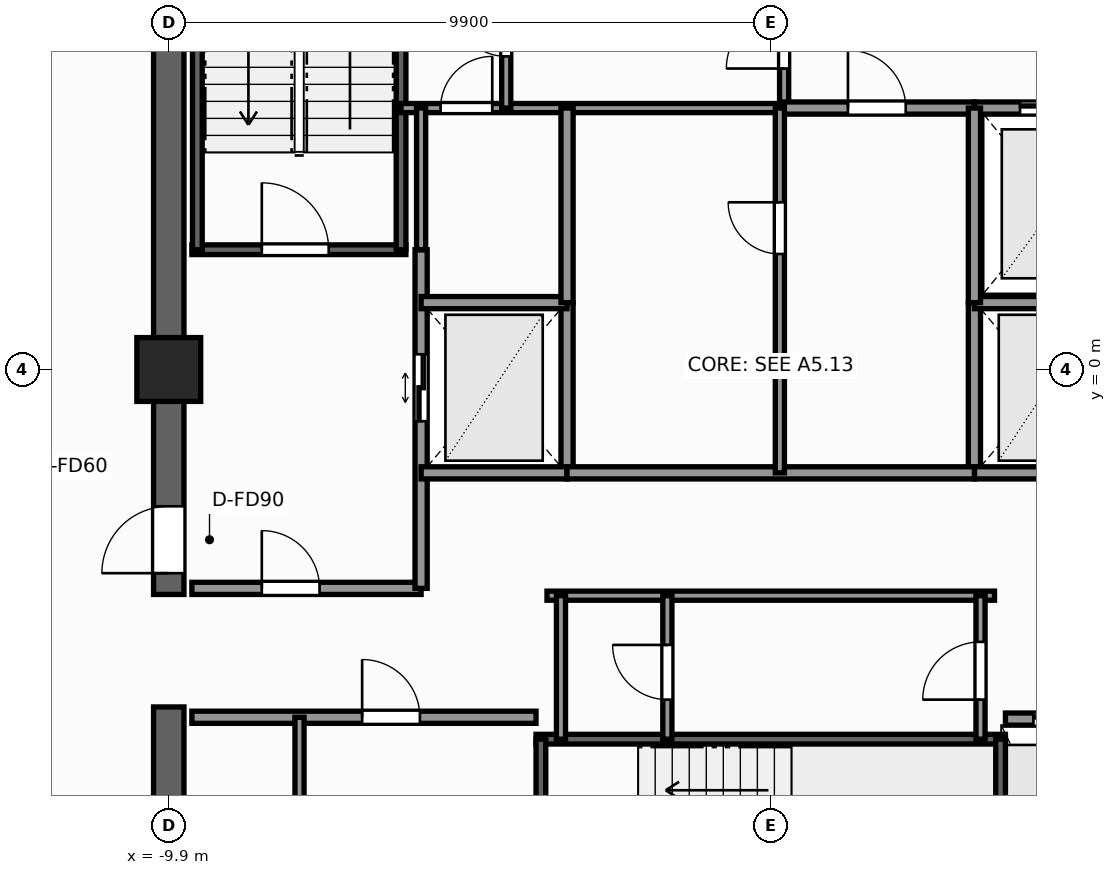
"""IFC4 building model, lengths in metres.
Left out: names, types, materials, properties, quantities, classifications, styles, units other than length and angle.
Written with IfcOpenShell. Run it as: python <this file> out.ifc"""

import sys

from ifc_helpers import new_model, si_unit, direction, frame, frame_2d, origin, origin_2d, place, context, subcontext, project, spatial, rectangle, extrude, element, fill, save


model = new_model("IFC4")
c1 = context("Model", 3, precision=1e-05, world=origin(), true_north=direction((0.0, 1.0)))
c2 = subcontext(c1, "Body", "Model", "MODEL_VIEW")
j1 = project(units=[si_unit("LENGTHUNIT", "METRE"), si_unit("PLANEANGLEUNIT", "RADIAN")], contexts=[c1])
p1 = place(None, origin())
s1 = spatial("IfcSite", under=j1, at=p1, CompositionType="ELEMENT")
p2 = place(p1, origin())
s2 = spatial("IfcBuilding", under=s1, at=p2, CompositionType="ELEMENT")
p3 = place(p2, frame((0.0, 0.0, 199.8)))
s3 = spatial("IfcBuildingStorey", under=s2, at=p3, CompositionType="ELEMENT", Elevation=199.8)
p4 = place(p3, frame((-9.9, -9.65, 0.0), z_axis=(0.0, 0.0, 1.0), x_axis=(0.0, 1.0, 0.0)))
e1 = element("IfcWall", 1, at=p4, inside=s3, PredefinedType="SHEAR", context=c2, shape_type="SweptSolid", body=[
    extrude(rectangle(XDim=4.1, YDim=0.5, at=frame_2d((2.05, 0.0))), origin(), (0.0, 0.0, 1.0), 3.3),
])
p5 = place(p3, frame((-9.9, -3.7, 0.0), z_axis=(0.0, 0.0, 1.0), x_axis=(0.0, 1.0, 0.0)))
e2 = element("IfcWall", 2, at=p5, inside=s3, PredefinedType="SHEAR", context=c2, shape_type="SweptSolid", body=[
    extrude(rectangle(XDim=13.35, YDim=0.5, at=frame_2d((6.675, 0.0))), origin(), (0.0, 0.0, 1.0), 3.3),
])
p6 = place(p5, frame((0.35, 0.0, 0.0)))
e3 = element("IfcOpeningElement", 3, at=p6, cuts=e2, PredefinedType="OPENING", context=c2, shape_type="SweptSolid", body=[
    extrude(rectangle(XDim=1.1, YDim=2.2, at=frame_2d((0.55, 1.1))), frame((0.0, 0.26, 0.0), z_axis=(0.0, -1.0, 0.0), x_axis=(1.0, 0.0, 0.0)), (0.0, 0.0, 1.0), 0.52),
])
p7 = place(p3, frame((-9.9, 0.0, 0.0), z_axis=(0.0, 0.0, 1.0), x_axis=(1.0, 0.0, 0.0)))
e4 = element("IfcColumn", 4, at=p7, inside=s3, PredefinedType="COLUMN", context=c2, shape_type="SweptSolid", body=[
    extrude(rectangle(XDim=1.05, YDim=1.05, at=origin_2d()), origin(), (0.0, 0.0, 1.0), 3.3),
])
p8 = place(p3, frame((-9.52, 1.97, 0.0), z_axis=(0.0, 0.0, 1.0), x_axis=(1.0, 0.0, 0.0)))
e5 = element("IfcWall", 5, at=p8, inside=s3, PredefinedType="SHEAR", context=c2, shape_type="SweptSolid", body=[
    extrude(rectangle(XDim=3.52, YDim=0.16, at=frame_2d((1.76, 0.0))), origin(), (0.0, 0.0, 1.0), 3.3),
])
p9 = place(p8, frame((1.15, 0.0, 0.0)))
e6 = element("IfcOpeningElement", 6, at=p9, cuts=e5, PredefinedType="OPENING", context=c2, shape_type="SweptSolid", body=[
    extrude(rectangle(XDim=1.1, YDim=2.2, at=frame_2d((0.55, 1.1))), frame((0.0, 0.09, 0.0), z_axis=(0.0, -1.0, 0.0), x_axis=(1.0, 0.0, 0.0)), (0.0, 0.0, 1.0), 0.18),
])
for number, where, z_axis, x_axis in (
    (7, (-9.43, 1.97, 0.0), (0.0, 0.0, 1.0), (0.0, 1.0, 0.0)),
    (8, (-6.08, 1.97, 0.0), (0.0, 0.0, 1.0), (0.0, 1.0, 0.0)),
):
    element("IfcWall", number, at=place(p3, frame(where, z_axis=z_axis, x_axis=x_axis)), inside=s3, PredefinedType="SHEAR", context=c2, shape_type="SweptSolid", body=[
        extrude(rectangle(XDim=7.56, YDim=0.16, at=frame_2d((3.78, 0.0))), origin(), (0.0, 0.0, 1.0), 3.3),
    ])
p10 = place(p3, frame((-3.86, -6.08, 0.0), z_axis=(0.0, 0.0, 1.0), x_axis=(1.0, 0.0, 0.0)))
e9 = element("IfcWall", 9, at=p10, inside=s3, PredefinedType="SHEAR", context=c2, shape_type="SweptSolid", body=[
    extrude(rectangle(XDim=7.72, YDim=0.16, at=frame_2d((3.86, 0.0))), origin(), (0.0, 0.0, 1.0), 3.3),
])
for number, where, z_axis, x_axis in (
    (10, (-3.78, -9.43, 0.0), (0.0, 0.0, 1.0), (0.0, 1.0, 0.0)),
    (11, (3.78, -9.43, 0.0), (0.0, 0.0, 1.0), (0.0, 1.0, 0.0)),
):
    element("IfcWall", number, at=place(p3, frame(where, z_axis=z_axis, x_axis=x_axis)), inside=s3, PredefinedType="SHEAR", context=c2, shape_type="SweptSolid", body=[
        extrude(rectangle(XDim=3.35, YDim=0.16, at=frame_2d((1.675, 0.0))), origin(), (0.0, 0.0, 1.0), 3.3),
    ])
p11 = place(p3, frame((-9.52, -3.6, 0.0), z_axis=(0.0, 0.0, 1.0), x_axis=(1.0, 0.0, 0.0)))
e12 = element("IfcWall", 12, at=p11, inside=s3, PredefinedType="SOLIDWALL", context=c2, shape_type="SweptSolid", body=[
    extrude(rectangle(XDim=3.77, YDim=0.2, at=frame_2d((1.885, 0.0))), origin(), (0.0, 0.0, 1.0), 3.08),
])
p12 = place(p11, frame((1.15, 0.0, 0.0)))
e13 = element("IfcOpeningElement", 13, at=p12, cuts=e12, PredefinedType="OPENING", context=c2, shape_type="SweptSolid", body=[
    extrude(rectangle(XDim=0.95, YDim=2.06, at=frame_2d((0.475, 1.03))), frame((0.0, 0.11, 0.0), z_axis=(0.0, -1.0, 0.0), x_axis=(1.0, 0.0, 0.0)), (0.0, 0.0, 1.0), 0.22),
])
p13 = place(p3, frame((-5.75, -3.6, 0.0), z_axis=(0.0, 0.0, 1.0), x_axis=(0.0, 1.0, 0.0)))
e14 = element("IfcWall", 14, at=p13, inside=s3, PredefinedType="SOLIDWALL", context=c2, shape_type="SweptSolid", body=[
    extrude(rectangle(XDim=5.57, YDim=0.2, at=frame_2d((2.785, 0.0))), origin(), (0.0, 0.0, 1.0), 3.08),
])
p14 = place(p13, frame((2.75, 0.0, 0.0)))
e15 = element("IfcOpeningElement", 15, at=p14, cuts=e14, PredefinedType="OPENING", context=c2, shape_type="SweptSolid", body=[
    extrude(rectangle(XDim=1.1, YDim=2.2, at=frame_2d((0.55, 1.1))), frame((0.0, 0.11, 0.0), z_axis=(0.0, -1.0, 0.0), x_axis=(1.0, 0.0, 0.0)), (0.0, 0.0, 1.0), 0.22),
])
p15 = place(p3, frame((-3.35, -1.7, 0.0), z_axis=(0.0, 0.0, 1.0), x_axis=(0.0, 1.0, 0.0)))
e16 = element("IfcWall", 16, at=p15, inside=s3, PredefinedType="SOLIDWALL", context=c2, shape_type="SweptSolid", body=[
    extrude(rectangle(XDim=2.8, YDim=0.2, at=frame_2d((1.4, 0.0))), origin(), (0.0, 0.0, 1.0), 3.08),
])
for number, where, z_axis, x_axis in (
    (17, (-5.75, -1.7, 0.0), (0.0, 0.0, 1.0), (1.0, 0.0, 0.0)),
    (18, (-5.75, 1.1, 0.0), (0.0, 0.0, 1.0), (1.0, 0.0, 0.0)),
):
    element("IfcWall", number, at=place(p3, frame(where, z_axis=z_axis, x_axis=x_axis)), inside=s3, PredefinedType="SOLIDWALL", context=c2, shape_type="SweptSolid", body=[
        extrude(rectangle(XDim=2.4, YDim=0.2, at=frame_2d((1.2, 0.0))), origin(), (0.0, 0.0, 1.0), 3.08),
    ])
p16 = place(p3, frame((3.35, -1.7, 0.0), z_axis=(0.0, 0.0, 1.0), x_axis=(0.0, 1.0, 0.0)))
e19 = element("IfcWall", 19, at=p16, inside=s3, PredefinedType="SOLIDWALL", context=c2, shape_type="SweptSolid", body=[
    extrude(rectangle(XDim=2.8, YDim=0.2, at=frame_2d((1.4, 0.0))), origin(), (0.0, 0.0, 1.0), 3.08),
])
for number, where, z_axis, x_axis in (
    (20, (3.35, -1.7, 0.0), (0.0, 0.0, 1.0), (1.0, 0.0, 0.0)),
    (21, (3.35, 1.1, 0.0), (0.0, 0.0, 1.0), (1.0, 0.0, 0.0)),
):
    element("IfcWall", number, at=place(p3, frame(where, z_axis=z_axis, x_axis=x_axis)), inside=s3, PredefinedType="SOLIDWALL", context=c2, shape_type="SweptSolid", body=[
        extrude(rectangle(XDim=2.4, YDim=0.2, at=frame_2d((1.2, 0.0))), origin(), (0.0, 0.0, 1.0), 3.08),
    ])
p17 = place(p3, frame((3.35, 4.3, 0.0), z_axis=(0.0, 0.0, 1.0), x_axis=(1.0, 0.0, 0.0)))
e22 = element("IfcWall", 22, at=p17, inside=s3, PredefinedType="SOLIDWALL", context=c2, shape_type="SweptSolid", body=[
    extrude(rectangle(XDim=2.73, YDim=0.2, at=frame_2d((1.365, 0.0))), origin(), (0.0, 0.0, 1.0), 3.08),
])
p18 = place(p17, frame((0.75, 0.0, 0.0)))
e23 = element("IfcOpeningElement", 23, at=p18, cuts=e22, PredefinedType="OPENING", context=c2, shape_type="SweptSolid", body=[
    extrude(rectangle(XDim=1.2, YDim=2.25, at=frame_2d((0.6, 1.125))), frame((0.0, 0.11, 0.0), z_axis=(0.0, -1.0, 0.0), x_axis=(1.0, 0.0, 0.0)), (0.0, 0.0, 1.0), 0.22),
])
p19 = place(p3, frame((-6.08, 4.3, 0.0), z_axis=(0.0, 0.0, 1.0), x_axis=(1.0, 0.0, 0.0)))
e24 = element("IfcWall", 24, at=p19, inside=s3, PredefinedType="PARTITIONING", context=c2, shape_type="SweptSolid", body=[
    extrude(rectangle(XDim=6.3, YDim=0.15, at=frame_2d((3.15, 0.0))), origin(), (0.0, 0.0, 1.0), 3.08),
])
p20 = place(p19, frame((0.65, 0.0, 0.0)))
e25 = element("IfcOpeningElement", 25, at=p20, cuts=e24, PredefinedType="OPENING", context=c2, shape_type="SweptSolid", body=[
    extrude(rectangle(XDim=0.85, YDim=2.03, at=frame_2d((0.425, 1.015))), frame((0.0, 0.085, 0.0), z_axis=(0.0, -1.0, 0.0), x_axis=(1.0, 0.0, 0.0)), (0.0, 0.0, 1.0), 0.17),
])
p21 = place(p3, frame((0.22, 4.3, 0.0), z_axis=(0.0, 0.0, 1.0), x_axis=(0.0, 1.0, 0.0)))
e26 = element("IfcWall", 26, at=p21, inside=s3, PredefinedType="PARTITIONING", context=c2, shape_type="SweptSolid", body=[
    extrude(rectangle(XDim=5.22, YDim=0.15, at=frame_2d((2.61, 0.0))), origin(), (0.0, 0.0, 1.0), 3.08),
])
p22 = place(p21, frame((0.65, 0.0, 0.0)))
e27 = element("IfcOpeningElement", 27, at=p22, cuts=e26, PredefinedType="OPENING", context=c2, shape_type="SweptSolid", body=[
    extrude(rectangle(XDim=0.95, YDim=2.06, at=frame_2d((0.475, 1.03))), frame((0.0, 0.085, 0.0), z_axis=(0.0, -1.0, 0.0), x_axis=(1.0, 0.0, 0.0)), (0.0, 0.0, 1.0), 0.17),
])
p23 = place(p3, frame((-4.35, 4.3, 0.0), z_axis=(0.0, 0.0, 1.0), x_axis=(0.0, 1.0, 0.0)))
e28 = element("IfcWall", 28, at=p23, inside=s3, PredefinedType="PARTITIONING", context=c2, shape_type="SweptSolid", body=[
    extrude(rectangle(XDim=5.22, YDim=0.15, at=frame_2d((2.61, 0.0))), origin(), (0.0, 0.0, 1.0), 3.08),
])
p24 = place(p23, frame((0.85, 0.0, 0.0)))
e29 = element("IfcOpeningElement", 29, at=p24, cuts=e28, PredefinedType="OPENING", context=c2, shape_type="SweptSolid", body=[
    extrude(rectangle(XDim=0.85, YDim=2.03, at=frame_2d((0.425, 1.015))), frame((0.0, 0.085, 0.0), z_axis=(0.0, -1.0, 0.0), x_axis=(1.0, 0.0, 0.0)), (0.0, 0.0, 1.0), 0.17),
])
p25 = place(p3, frame((-9.52, -5.72, 0.0), z_axis=(0.0, 0.0, 1.0), x_axis=(1.0, 0.0, 0.0)))
e30 = element("IfcWall", 30, at=p25, inside=s3, PredefinedType="SOLIDWALL", context=c2, shape_type="SweptSolid", body=[
    extrude(rectangle(XDim=5.66, YDim=0.2, at=frame_2d((2.83, 0.0))), origin(), (0.0, 0.0, 1.0), 3.08),
])
p26 = place(p25, frame((2.8, 0.0, 0.0)))
e31 = element("IfcOpeningElement", 31, at=p26, cuts=e30, PredefinedType="OPENING", context=c2, shape_type="SweptSolid", body=[
    extrude(rectangle(XDim=0.95, YDim=2.06, at=frame_2d((0.475, 1.03))), frame((0.0, 0.11, 0.0), z_axis=(0.0, -1.0, 0.0), x_axis=(1.0, 0.0, 0.0)), (0.0, 0.0, 1.0), 0.22),
])
p27 = place(p3, frame((-7.75, -9.52, 0.0), z_axis=(0.0, 0.0, 1.0), x_axis=(0.0, 1.0, 0.0)))
e32 = element("IfcWall", 32, at=p27, inside=s3, PredefinedType="PARTITIONING", context=c2, shape_type="SweptSolid", body=[
    extrude(rectangle(XDim=3.8, YDim=0.15, at=frame_2d((1.9, 0.0))), origin(), (0.0, 0.0, 1.0), 3.08),
])
p28 = place(p27, frame((0.9, 0.0, 0.0)))
e33 = element("IfcOpeningElement", 33, at=p28, cuts=e32, PredefinedType="OPENING", context=c2, shape_type="SweptSolid", body=[
    extrude(rectangle(XDim=0.85, YDim=2.03, at=frame_2d((0.425, 1.015))), frame((0.0, 0.085, 0.0), z_axis=(0.0, -1.0, 0.0), x_axis=(1.0, 0.0, 0.0)), (0.0, 0.0, 1.0), 0.17),
])
p29 = place(p3, frame((3.86, -5.75, 0.0), z_axis=(0.0, 0.0, 1.0), x_axis=(1.0, 0.0, 0.0)))
e34 = element("IfcWall", 34, at=p29, inside=s3, PredefinedType="SOLIDWALL", context=c2, shape_type="SweptSolid", body=[
    extrude(rectangle(XDim=5.66, YDim=0.2, at=frame_2d((2.83, 0.0))), origin(), (0.0, 0.0, 1.0), 3.08),
])
p30 = place(p29, frame((0.46, 0.0, 0.0)))
e35 = element("IfcOpeningElement", 35, at=p30, cuts=e34, PredefinedType="OPENING", context=c2, shape_type="SweptSolid", body=[
    extrude(rectangle(XDim=1.1, YDim=2.2, at=frame_2d((0.55, 1.1))), frame((0.0, 0.11, 0.0), z_axis=(0.0, -1.0, 0.0), x_axis=(1.0, 0.0, 0.0)), (0.0, 0.0, 1.0), 0.22),
])
p31 = place(p29, frame((2.39, 0.0, 0.0)))
e36 = element("IfcOpeningElement", 36, at=p31, cuts=e34, PredefinedType="OPENING", context=c2, shape_type="SweptSolid", body=[
    extrude(rectangle(XDim=1.1, YDim=2.2, at=frame_2d((0.55, 1.1))), frame((0.0, 0.11, 0.0), z_axis=(0.0, -1.0, 0.0), x_axis=(1.0, 0.0, 0.0)), (0.0, 0.0, 1.0), 0.22),
])
p32 = place(p29, frame((4.32, 0.0, 0.0)))
e37 = element("IfcOpeningElement", 37, at=p32, cuts=e34, PredefinedType="OPENING", context=c2, shape_type="SweptSolid", body=[
    extrude(rectangle(XDim=1.1, YDim=2.2, at=frame_2d((0.55, 1.1))), frame((0.0, 0.11, 0.0), z_axis=(0.0, -1.0, 0.0), x_axis=(1.0, 0.0, 0.0)), (0.0, 0.0, 1.0), 0.22),
])
p33 = place(p3, frame((0.22, 4.3, 0.0), z_axis=(0.0, 0.0, 1.0), x_axis=(1.0, 0.0, 0.0)))
e38 = element("IfcWall", 38, at=p33, inside=s3, PredefinedType="SOLIDWALL", context=c2, shape_type="SweptSolid", body=[
    extrude(rectangle(XDim=3.13, YDim=0.2, at=frame_2d((1.565, 0.0))), origin(), (0.0, 0.0, 1.0), 3.08),
])
p34 = place(p33, frame((1.05, 0.0, 0.0)))
e39 = element("IfcOpeningElement", 39, at=p34, cuts=e38, PredefinedType="OPENING", context=c2, shape_type="SweptSolid", body=[
    extrude(rectangle(XDim=0.95, YDim=2.06, at=frame_2d((0.475, 1.03))), frame((0.0, 0.11, 0.0), z_axis=(0.0, -1.0, 0.0), x_axis=(1.0, 0.0, 0.0)), (0.0, 0.0, 1.0), 0.22),
])
p35 = place(p3, frame((-3.35, -1.7, 0.0), z_axis=(0.0, 0.0, 1.0), x_axis=(1.0, 0.0, 0.0)))
e40 = element("IfcWall", 40, at=p35, inside=s3, PredefinedType="SOLIDWALL", context=c2, shape_type="SweptSolid", body=[
    extrude(rectangle(XDim=6.7, YDim=0.2, at=frame_2d((3.35, 0.0))), origin(), (0.0, 0.0, 1.0), 3.08),
])
for number, where, z_axis, x_axis in (
    (41, (-3.35, 1.1, 0.0), (0.0, 0.0, 1.0), (0.0, 1.0, 0.0)),
    (42, (3.35, 1.1, 0.0), (0.0, 0.0, 1.0), (0.0, 1.0, 0.0)),
):
    element("IfcWall", number, at=place(p3, frame(where, z_axis=z_axis, x_axis=x_axis)), inside=s3, PredefinedType="SOLIDWALL", context=c2, shape_type="SweptSolid", body=[
        extrude(rectangle(XDim=3.2, YDim=0.2, at=frame_2d((1.6, 0.0))), origin(), (0.0, 0.0, 1.0), 3.08),
    ])
p36 = place(p3, frame((0.15, -1.7, 0.0), z_axis=(0.0, 0.0, 1.0), x_axis=(0.0, 1.0, 0.0)))
e43 = element("IfcWall", 43, at=p36, inside=s3, PredefinedType="PARTITIONING", context=c2, shape_type="SweptSolid", body=[
    extrude(rectangle(XDim=6.0, YDim=0.15, at=frame_2d((3.0, 0.0))), origin(), (0.0, 0.0, 1.0), 3.08),
])
p37 = place(p36, frame((3.6, 0.0, 0.0)))
e44 = element("IfcOpeningElement", 44, at=p37, cuts=e43, PredefinedType="OPENING", context=c2, shape_type="SweptSolid", body=[
    extrude(rectangle(XDim=0.85, YDim=2.03, at=frame_2d((0.425, 1.015))), frame((0.0, 0.085, 0.0), z_axis=(0.0, -1.0, 0.0), x_axis=(1.0, 0.0, 0.0)), (0.0, 0.0, 1.0), 0.17),
])
p38 = place(p3, frame((-3.68, -3.72, 0.0), z_axis=(0.0, 0.0, 1.0), x_axis=(1.0, 0.0, 0.0)))
e45 = element("IfcWall", 45, at=p38, inside=s3, PredefinedType="PARTITIONING", context=c2, shape_type="SweptSolid", body=[
    extrude(rectangle(XDim=7.36, YDim=0.15, at=frame_2d((3.68, 0.0))), origin(), (0.0, 0.0, 1.0), 3.08),
])
p39 = place(p3, frame((3.45, -6.08, 0.0), z_axis=(0.0, 0.0, 1.0), x_axis=(0.0, 1.0, 0.0)))
e46 = element("IfcWall", 46, at=p39, inside=s3, PredefinedType="PARTITIONING", context=c2, shape_type="SweptSolid", body=[
    extrude(rectangle(XDim=2.36, YDim=0.15, at=frame_2d((1.18, 0.0))), origin(), (0.0, 0.0, 1.0), 3.08),
])
p40 = place(p39, frame((0.65, 0.0, 0.0)))
e47 = element("IfcOpeningElement", 47, at=p40, cuts=e46, PredefinedType="OPENING", context=c2, shape_type="SweptSolid", body=[
    extrude(rectangle(XDim=0.95, YDim=2.06, at=frame_2d((0.475, 1.03))), frame((0.0, 0.085, 0.0), z_axis=(0.0, -1.0, 0.0), x_axis=(1.0, 0.0, 0.0)), (0.0, 0.0, 1.0), 0.17),
])
p41 = place(p3, frame((-3.45, -6.08, 0.0), z_axis=(0.0, 0.0, 1.0), x_axis=(0.0, 1.0, 0.0)))
e48 = element("IfcWall", 48, at=p41, inside=s3, PredefinedType="PARTITIONING", context=c2, shape_type="SweptSolid", body=[
    extrude(rectangle(XDim=2.36, YDim=0.15, at=frame_2d((1.18, 0.0))), origin(), (0.0, 0.0, 1.0), 3.08),
])
p42 = place(p3, frame((-1.7, -6.08, 0.0), z_axis=(0.0, 0.0, 1.0), x_axis=(0.0, 1.0, 0.0)))
e49 = element("IfcWall", 49, at=p42, inside=s3, PredefinedType="PARTITIONING", context=c2, shape_type="SweptSolid", body=[
    extrude(rectangle(XDim=2.36, YDim=0.15, at=frame_2d((1.18, 0.0))), origin(), (0.0, 0.0, 1.0), 3.08),
])
p43 = place(p42, frame((0.65, 0.0, 0.0)))
e50 = element("IfcOpeningElement", 50, at=p43, cuts=e49, PredefinedType="OPENING", context=c2, shape_type="SweptSolid", body=[
    extrude(rectangle(XDim=0.9, YDim=2.06, at=frame_2d((0.45, 1.03))), frame((0.0, 0.085, 0.0), z_axis=(0.0, -1.0, 0.0), x_axis=(1.0, 0.0, 0.0)), (0.0, 0.0, 1.0), 0.17),
])
p44 = place(p3, frame((-5.75, 1.97, 0.0), z_axis=(0.0, 0.0, 1.0), x_axis=(0.0, 1.0, 0.0)))
e51 = element("IfcWall", 51, at=p44, inside=s3, PredefinedType="PARTITIONING", context=c2, shape_type="SweptSolid", body=[
    extrude(rectangle(XDim=2.33, YDim=0.15, at=frame_2d((1.165, 0.0))), origin(), (0.0, 0.0, 1.0), 3.08),
])
p45 = place(p9, origin())
e52 = element("IfcDoor", 52, at=p45, inside=s3, OperationType="SINGLE_SWING_LEFT", PredefinedType="DOOR", context=c2, shape_type="SweptSolid", body=[
    extrude(rectangle(XDim=1.1, YDim=2.2, at=frame_2d((0.55, 1.1))), frame((0.0, 0.025, 0.0), z_axis=(0.0, -1.0, 0.0), x_axis=(1.0, 0.0, 0.0)), (0.0, 0.0, 1.0), 0.05),
])
fill(e6, e52)
p46 = place(p6, origin())
e53 = element("IfcDoor", 53, at=p46, inside=s3, OperationType="SINGLE_SWING_LEFT", PredefinedType="DOOR", context=c2, shape_type="SweptSolid", body=[
    extrude(rectangle(XDim=1.1, YDim=2.2, at=frame_2d((0.55, 1.1))), frame((0.0, 0.025, 0.0), z_axis=(0.0, -1.0, 0.0), x_axis=(1.0, 0.0, 0.0)), (0.0, 0.0, 1.0), 0.05),
])
fill(e3, e53)
p47 = place(p14, origin())
e54 = element("IfcDoor", 54, at=p47, inside=s3, OperationType="DOUBLE_DOOR_SLIDING", PredefinedType="DOOR", context=c2, shape_type="SweptSolid", body=[
    extrude(rectangle(XDim=1.1, YDim=2.2, at=frame_2d((0.55, 1.1))), frame((0.0, 0.025, 0.0), z_axis=(0.0, -1.0, 0.0), x_axis=(1.0, 0.0, 0.0)), (0.0, 0.0, 1.0), 0.05),
])
fill(e15, e54)
p48 = place(p18, origin())
e55 = element("IfcDoor", 55, at=p48, inside=s3, OperationType="DOUBLE_DOOR_SLIDING", PredefinedType="DOOR", context=c2, shape_type="SweptSolid", body=[
    extrude(rectangle(XDim=1.2, YDim=2.25, at=frame_2d((0.6, 1.125))), frame((0.0, 0.025, 0.0), z_axis=(0.0, -1.0, 0.0), x_axis=(1.0, 0.0, 0.0)), (0.0, 0.0, 1.0), 0.05),
])
fill(e23, e55)
p49 = place(p22, origin())
e56 = element("IfcDoor", 56, at=p49, inside=s3, OperationType="SINGLE_SWING_LEFT", PredefinedType="DOOR", context=c2, shape_type="SweptSolid", body=[
    extrude(rectangle(XDim=0.95, YDim=2.06, at=frame_2d((0.475, 1.03))), frame((0.0, 0.025, 0.0), z_axis=(0.0, -1.0, 0.0), x_axis=(1.0, 0.0, 0.0)), (0.0, 0.0, 1.0), 0.05),
])
fill(e27, e56)
p50 = place(p24, origin())
e57 = element("IfcDoor", 57, at=p50, inside=s3, OperationType="SINGLE_SWING_RIGHT", PredefinedType="DOOR", context=c2, shape_type="SweptSolid", body=[
    extrude(rectangle(XDim=0.85, YDim=2.03, at=frame_2d((0.425, 1.015))), frame((0.0, 0.025, 0.0), z_axis=(0.0, -1.0, 0.0), x_axis=(1.0, 0.0, 0.0)), (0.0, 0.0, 1.0), 0.05),
])
fill(e29, e57)
p51 = place(p26, origin())
e58 = element("IfcDoor", 58, at=p51, inside=s3, OperationType="SINGLE_SWING_LEFT", PredefinedType="DOOR", context=c2, shape_type="SweptSolid", body=[
    extrude(rectangle(XDim=0.95, YDim=2.06, at=frame_2d((0.475, 1.03))), frame((0.0, 0.025, 0.0), z_axis=(0.0, -1.0, 0.0), x_axis=(1.0, 0.0, 0.0)), (0.0, 0.0, 1.0), 0.05),
])
fill(e31, e58)
p52 = place(p12, origin())
e59 = element("IfcDoor", 59, at=p52, inside=s3, OperationType="SINGLE_SWING_LEFT", PredefinedType="DOOR", context=c2, shape_type="SweptSolid", body=[
    extrude(rectangle(XDim=0.95, YDim=2.06, at=frame_2d((0.475, 1.03))), frame((0.0, 0.025, 0.0), z_axis=(0.0, -1.0, 0.0), x_axis=(1.0, 0.0, 0.0)), (0.0, 0.0, 1.0), 0.05),
])
fill(e13, e59)
p53 = place(p30, origin())
e60 = element("IfcDoor", 60, at=p53, inside=s3, OperationType="DOUBLE_DOOR_SLIDING", PredefinedType="DOOR", context=c2, shape_type="SweptSolid", body=[
    extrude(rectangle(XDim=1.1, YDim=2.2, at=frame_2d((0.55, 1.1))), frame((0.0, 0.025, 0.0), z_axis=(0.0, -1.0, 0.0), x_axis=(1.0, 0.0, 0.0)), (0.0, 0.0, 1.0), 0.05),
])
fill(e35, e60)
p54 = place(p34, origin())
e61 = element("IfcDoor", 61, at=p54, inside=s3, OperationType="SINGLE_SWING_LEFT", PredefinedType="DOOR", context=c2, shape_type="SweptSolid", body=[
    extrude(rectangle(XDim=0.95, YDim=2.06, at=frame_2d((0.475, 1.03))), frame((0.0, 0.025, 0.0), z_axis=(0.0, -1.0, 0.0), x_axis=(1.0, 0.0, 0.0)), (0.0, 0.0, 1.0), 0.05),
])
fill(e39, e61)
p55 = place(p37, origin())
e62 = element("IfcDoor", 62, at=p55, inside=s3, OperationType="SINGLE_SWING_RIGHT", PredefinedType="DOOR", context=c2, shape_type="SweptSolid", body=[
    extrude(rectangle(XDim=0.85, YDim=2.03, at=frame_2d((0.425, 1.015))), frame((0.0, 0.025, 0.0), z_axis=(0.0, -1.0, 0.0), x_axis=(1.0, 0.0, 0.0)), (0.0, 0.0, 1.0), 0.05),
])
fill(e44, e62)
p56 = place(p40, origin())
e63 = element("IfcDoor", 63, at=p56, inside=s3, OperationType="SINGLE_SWING_LEFT", PredefinedType="DOOR", context=c2, shape_type="SweptSolid", body=[
    extrude(rectangle(XDim=0.95, YDim=2.06, at=frame_2d((0.475, 1.03))), frame((0.0, 0.025, 0.0), z_axis=(0.0, -1.0, 0.0), x_axis=(1.0, 0.0, 0.0)), (0.0, 0.0, 1.0), 0.05),
])
fill(e47, e63)
p57 = place(p43, origin())
e64 = element("IfcDoor", 64, at=p57, inside=s3, OperationType="SINGLE_SWING_RIGHT", PredefinedType="DOOR", context=c2, shape_type="SweptSolid", body=[
    extrude(rectangle(XDim=0.9, YDim=2.06, at=frame_2d((0.45, 1.03))), frame((0.0, 0.025, 0.0), z_axis=(0.0, -1.0, 0.0), x_axis=(1.0, 0.0, 0.0)), (0.0, 0.0, 1.0), 0.05),
])
fill(e50, e64)
p58 = place(p20, origin())
e65 = element("IfcDoor", 65, at=p58, inside=s3, OperationType="SINGLE_SWING_RIGHT", PredefinedType="DOOR", context=c2, shape_type="SweptSolid", body=[
    extrude(rectangle(XDim=0.85, YDim=2.03, at=frame_2d((0.425, 1.015))), frame((0.0, 0.025, 0.0), z_axis=(0.0, -1.0, 0.0), x_axis=(1.0, 0.0, 0.0)), (0.0, 0.0, 1.0), 0.05),
])
fill(e25, e65)
save(model, sys.argv[1])
